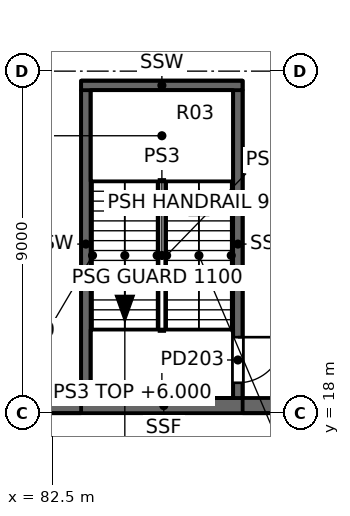
"""IFC4 building model, lengths in metres.
Left out: names, types, materials, properties, quantities, classifications, styles, units other than length and angle.
Written with IfcOpenShell. Run it as: python <this file> out.ifc"""

import sys

from ifc_helpers import new_model, si_unit, direction, frame, frame_2d, origin, place, context, subcontext, project, spatial, rectangle, extrude, element, fill, save


model = new_model("IFC4")
c1 = context("Model", 3, precision=1e-05, world=origin(), true_north=direction((0.0, 1.0)))
c2 = subcontext(c1, "Body", "Model", "MODEL_VIEW")
j1 = project(units=[si_unit("LENGTHUNIT", "METRE"), si_unit("PLANEANGLEUNIT", "RADIAN")], contexts=[c1])
p1 = place(None, origin())
s1 = spatial("IfcSite", under=j1, at=p1, CompositionType="ELEMENT")
p2 = place(p1, origin())
s2 = spatial("IfcBuilding", under=s1, at=p2, CompositionType="ELEMENT")
p3 = place(p2, frame((0.0, 0.0, 6.0)))
s3 = spatial("IfcBuildingStorey", under=s2, at=p3, CompositionType="ELEMENT", Elevation=6.0)
p4 = place(p3, frame((83.375, 18.4, 0.0), z_axis=(0.0, 0.0, 1.0), x_axis=(0.0, 1.0, 0.0)))
e1 = element("IfcWall", 1, at=p4, inside=s3, PredefinedType="SOLIDWALL", context=c2, shape_type="SweptSolid", body=[
    extrude(rectangle(XDim=8.1, YDim=0.25, at=frame_2d((4.05, 0.0))), origin(), (0.0, 0.0, 1.0), 5.4),
])
p5 = place(p3, frame((87.375, 26.5, 0.0), z_axis=(0.0, 0.0, 1.0), x_axis=(0.0, -1.0, 0.0)))
e2 = element("IfcWall", 2, at=p5, inside=s3, PredefinedType="SOLIDWALL", context=c2, shape_type="SweptSolid", body=[
    extrude(rectangle(XDim=8.1, YDim=0.25, at=frame_2d((4.05, 0.0))), origin(), (0.0, 0.0, 1.0), 5.4),
])
p6 = place(p5, frame((6.5, 0.0, 0.0)))
e3 = element("IfcOpeningElement", 3, at=p6, cuts=e2, PredefinedType="OPENING", context=c2, shape_type="SweptSolid", body=[
    extrude(rectangle(XDim=1.2, YDim=2.1, at=frame_2d((0.6, 1.05))), frame((0.0, 0.125, 0.0), z_axis=(0.0, -1.0, 0.0), x_axis=(1.0, 0.0, 0.0)), (0.0, 0.0, 1.0), 0.25),
])
p7 = place(p3, frame((83.25, 26.625, 0.0), z_axis=(0.0, 0.0, 1.0), x_axis=(1.0, 0.0, 0.0)))
e4 = element("IfcWall", 4, at=p7, inside=s3, PredefinedType="SOLIDWALL", context=c2, shape_type="SweptSolid", body=[
    extrude(rectangle(XDim=4.25, YDim=0.25, at=frame_2d((2.125, 0.0))), origin(), (0.0, 0.0, 1.0), 5.4),
])
p8 = place(p3, frame((89.1, 18.2, 0.0), z_axis=(0.0, 0.0, 1.0), x_axis=(-1.0, 0.0, 0.0)))
e5 = element("IfcWall", 5, at=p8, inside=s3, PredefinedType="SOLIDWALL", context=c2, shape_type="SweptSolid", body=[
    extrude(rectangle(XDim=7.35, YDim=0.4, at=frame_2d((3.675, 0.0))), origin(), (0.0, 0.0, 1.0), 5.05),
])
p9 = place(p6, origin())
e6 = element("IfcDoor", 6, at=p9, inside=s3, OperationType="SINGLE_SWING_LEFT", PredefinedType="DOOR", context=c2, shape_type="SweptSolid", body=[
    extrude(rectangle(XDim=1.2, YDim=2.1, at=frame_2d((0.6, 1.05))), frame((0.0, 0.025, 0.0), z_axis=(0.0, -1.0, 0.0), x_axis=(1.0, 0.0, 0.0)), (0.0, 0.0, 1.0), 0.05),
])
fill(e3, e6)
save(model, sys.argv[1])
